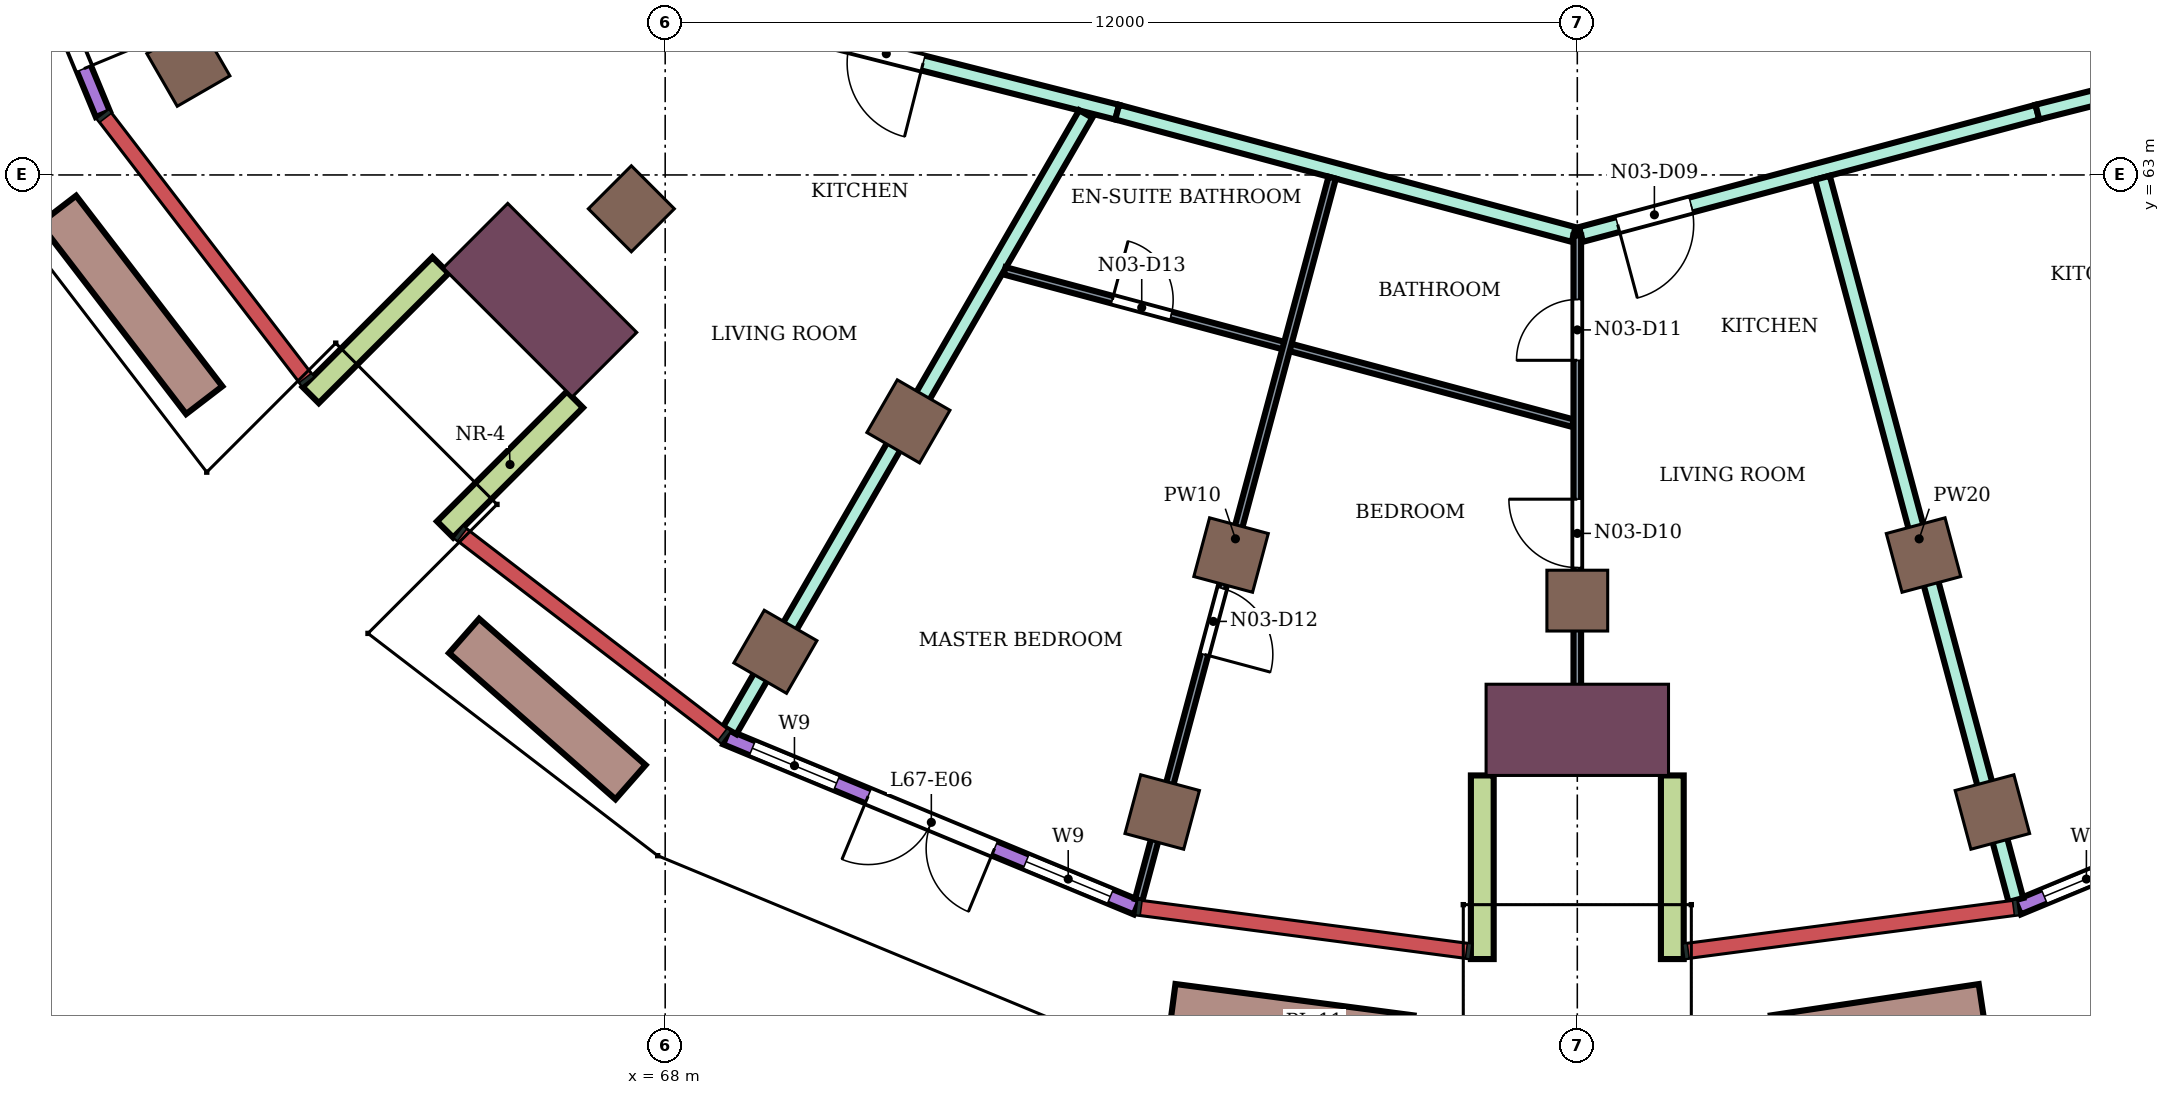
"""IFC4 building model, lengths in metres.
Left out: names, types, materials, properties, quantities, classifications, styles, units other than length and angle.
Written with IfcOpenShell. Run it as: python <this file> out.ifc"""

import sys

from ifc_helpers import new_model, si_unit, direction, frame, frame_2d, origin, origin_2d, place, context, subcontext, project, spatial, rectangle, extrude, element, fill, save


model = new_model("IFC4")
c1 = context("Model", 3, precision=1e-05, world=origin(), true_north=direction((0.0, 1.0)))
c2 = subcontext(c1, "Body", "Model", "MODEL_VIEW")
j1 = project(units=[si_unit("LENGTHUNIT", "METRE"), si_unit("PLANEANGLEUNIT", "RADIAN")], contexts=[c1])
p1 = place(None, origin())
s1 = spatial("IfcSite", under=j1, at=p1, CompositionType="ELEMENT")
p2 = place(p1, origin())
s2 = spatial("IfcBuilding", under=s1, at=p2, CompositionType="ELEMENT")
p3 = place(p2, frame((0.0, 0.0, 292.5)))
s3 = spatial("IfcBuildingStorey", under=s2, at=p3, CompositionType="ELEMENT", Elevation=292.5)
for number, where, z_axis, x_axis in (
    (1, (61.727, 64.45, 0.0), (0.0, 0.0, 1.0), (-0.866, -0.5, 0.0)),
    (2, (69.45, 56.727, 0.0), (0.0, 0.0, 1.0), (-0.5, -0.866, 0.0)),
    (3, (74.539, 54.619, 0.0), (0.0, 0.0, 1.0), (-0.259, -0.966, 0.0)),
    (4, (85.461, 54.619, 0.0), (0.0, 0.0, 1.0), (0.259, -0.966, 0.0)),
    (5, (67.555, 62.555, 0.0), (0.0, 0.0, 1.0), (-0.707, -0.707, 0.0)),
    (6, (71.2, 59.758, 0.0), (0.0, 0.0, 1.0), (-0.5, -0.866, 0.0)),
    (7, (75.445, 58.0, 0.0), (0.0, 0.0, 1.0), (-0.259, -0.966, 0.0)),
    (8, (80.0, 57.4, 0.0), (0.0, 0.0, 1.0), (0.0, -1.0, 0.0)),
    (9, (84.555, 58.0, 0.0), (0.0, 0.0, 1.0), (0.259, -0.966, 0.0)),
):
    element("IfcColumn", number, at=place(p3, frame(where, z_axis=z_axis, x_axis=x_axis)), inside=s3, PredefinedType="COLUMN", context=c2, shape_type="SweptSolid", body=[
        extrude(rectangle(XDim=0.8, YDim=0.8, at=origin_2d()), origin(), (0.0, 0.0, 1.0), 4.2),
    ])
for number, where, z_axis, x_axis in (
    (10, (66.353, 61.353, 0.0), (0.0, 0.0, 1.0), (-0.707, -0.707, 0.0)),
    (11, (80.0, 55.7, 0.0), (0.0, 0.0, 1.0), (0.0, -1.0, 0.0)),
):
    element("IfcColumn", number, at=place(p3, frame(where, z_axis=z_axis, x_axis=x_axis)), inside=s3, PredefinedType="COLUMN", context=c2, shape_type="SweptSolid", body=[
        extrude(rectangle(XDim=1.2, YDim=2.4, at=origin_2d()), origin(), (0.0, 0.0, 1.0), 4.2),
    ])
p4 = place(p3, frame((58.364, 69.203, 0.0), z_axis=(0.0, 0.0, 1.0), x_axis=(0.382708254591, -0.923869250418, 0.0)))
e12 = element("IfcWall", 12, at=p4, inside=s3, PredefinedType="NOTDEFINED", context=c2, shape_type="SweptSolid", body=[
    extrude(rectangle(XDim=5.847, YDim=0.2, at=frame_2d((2.924, 0.0))), origin(), (0.0, 0.0, 1.0), 4.2),
])
p5 = place(p4, frame((1.75, 0.0, 0.9)))
e13 = element("IfcOpeningElement", 13, at=p5, cuts=e12, PredefinedType="OPENING", context=c2, shape_type="SweptSolid", body=[
    extrude(rectangle(XDim=1.2, YDim=2.7, at=frame_2d((0.6, 1.35))), frame((0.0, 0.11, 0.0), z_axis=(0.0, -1.0, 0.0), x_axis=(1.0, 0.0, 0.0)), (0.0, 0.0, 1.0), 0.22),
])
p6 = place(p4, frame((3.4, 0.0, 0.0)))
e14 = element("IfcOpeningElement", 14, at=p6, cuts=e12, PredefinedType="OPENING", context=c2, shape_type="SweptSolid", body=[
    extrude(rectangle(XDim=1.8, YDim=2.7, at=frame_2d((0.9, 1.35))), frame((0.0, 0.11, 0.0), z_axis=(0.0, -1.0, 0.0), x_axis=(1.0, 0.0, 0.0)), (0.0, 0.0, 1.0), 0.22),
])
p7 = place(p3, frame((68.801, 55.602, 0.0), z_axis=(0.0, 0.0, 1.0), x_axis=(0.923869250418, -0.382708254591, 0.0)))
e15 = element("IfcWall", 15, at=p7, inside=s3, PredefinedType="NOTDEFINED", context=c2, shape_type="SweptSolid", body=[
    extrude(rectangle(XDim=5.847, YDim=0.2, at=frame_2d((2.924, 0.0))), origin(), (0.0, 0.0, 1.0), 4.2),
])
p8 = place(p7, frame((0.375, 0.0, 0.9)))
e16 = element("IfcOpeningElement", 16, at=p8, cuts=e15, PredefinedType="OPENING", context=c2, shape_type="SweptSolid", body=[
    extrude(rectangle(XDim=1.2, YDim=2.7, at=frame_2d((0.6, 1.35))), frame((0.0, 0.11, 0.0), z_axis=(0.0, -1.0, 0.0), x_axis=(1.0, 0.0, 0.0)), (0.0, 0.0, 1.0), 0.22),
])
p9 = place(p7, frame((2.024, 0.0, 0.0)))
e17 = element("IfcOpeningElement", 17, at=p9, cuts=e15, PredefinedType="OPENING", context=c2, shape_type="SweptSolid", body=[
    extrude(rectangle(XDim=1.8, YDim=2.7, at=frame_2d((0.9, 1.35))), frame((0.0, 0.11, 0.0), z_axis=(0.0, -1.0, 0.0), x_axis=(1.0, 0.0, 0.0)), (0.0, 0.0, 1.0), 0.22),
])
p10 = place(p7, frame((4.273, 0.0, 0.9)))
e18 = element("IfcOpeningElement", 18, at=p10, cuts=e15, PredefinedType="OPENING", context=c2, shape_type="SweptSolid", body=[
    extrude(rectangle(XDim=1.2, YDim=2.7, at=frame_2d((0.6, 1.35))), frame((0.0, 0.11, 0.0), z_axis=(0.0, -1.0, 0.0), x_axis=(1.0, 0.0, 0.0)), (0.0, 0.0, 1.0), 0.22),
])
p11 = place(p3, frame((85.797, 53.364, 0.0), z_axis=(0.0, 0.0, 1.0), x_axis=(0.923869250418, 0.382708254591, 0.0)))
e19 = element("IfcWall", 19, at=p11, inside=s3, PredefinedType="NOTDEFINED", context=c2, shape_type="SweptSolid", body=[
    extrude(rectangle(XDim=5.847, YDim=0.2, at=frame_2d((2.924, 0.0))), origin(), (0.0, 0.0, 1.0), 4.2),
])
p12 = place(p11, frame((0.375, 0.0, 0.9)))
e20 = element("IfcOpeningElement", 20, at=p12, cuts=e19, PredefinedType="OPENING", context=c2, shape_type="SweptSolid", body=[
    extrude(rectangle(XDim=1.2, YDim=2.7, at=frame_2d((0.6, 1.35))), frame((0.0, 0.11, 0.0), z_axis=(0.0, -1.0, 0.0), x_axis=(1.0, 0.0, 0.0)), (0.0, 0.0, 1.0), 0.22),
])
p13 = place(p11, frame((2.024, 0.0, 0.0)))
e21 = element("IfcOpeningElement", 21, at=p13, cuts=e19, PredefinedType="OPENING", context=c2, shape_type="SweptSolid", body=[
    extrude(rectangle(XDim=1.8, YDim=2.7, at=frame_2d((0.9, 1.35))), frame((0.0, 0.11, 0.0), z_axis=(0.0, -1.0, 0.0), x_axis=(1.0, 0.0, 0.0)), (0.0, 0.0, 1.0), 0.22),
])
p14 = place(p11, frame((4.273, 0.0, 0.9)))
e22 = element("IfcOpeningElement", 22, at=p14, cuts=e19, PredefinedType="OPENING", context=c2, shape_type="SweptSolid", body=[
    extrude(rectangle(XDim=1.2, YDim=2.7, at=frame_2d((0.6, 1.35))), frame((0.0, 0.11, 0.0), z_axis=(0.0, -1.0, 0.0), x_axis=(1.0, 0.0, 0.0)), (0.0, 0.0, 1.0), 0.22),
])
for number, where, z_axis, x_axis in (
    (23, (65.045, 61.812, 0.0), (0.0, 0.0, 1.0), (-0.707, -0.707, 0.0)),
    (24, (66.812, 60.045, 0.0), (0.0, 0.0, 1.0), (-0.707, -0.707, 0.0)),
    (25, (78.75, 55.1, 0.0), (0.0, 0.0, 1.0), (0.0, -1.0, 0.0)),
    (26, (81.25, 55.1, 0.0), (0.0, 0.0, 1.0), (0.0, -1.0, 0.0)),
):
    element("IfcWall", number, at=place(p3, frame(where, z_axis=z_axis, x_axis=x_axis)), inside=s3, PredefinedType="NOTDEFINED", context=c2, shape_type="SweptSolid", body=[
        extrude(rectangle(XDim=2.416, YDim=0.3, at=frame_2d((1.208, 0.0))), origin(), (0.0, 0.0, 1.0), 4.2),
    ])
p15 = place(p3, frame((60.012, 62.544, 0.0), z_axis=(0.0, 0.0, 1.0), x_axis=(0.608765634962, -0.793350112932, 0.0)))
e27 = element("IfcWall", 27, at=p15, inside=s3, PredefinedType="USERDEFINED", context=c2, shape_type="SweptSolid", body=[
    extrude(rectangle(XDim=3.16, YDim=0.6, at=frame_2d((1.58, 0.0))), origin(), (0.0, 0.0, 1.0), 0.6),
])
p16 = place(p3, frame((65.354, 56.936, 0.0), z_axis=(0.0, 0.0, 1.0), x_axis=(0.751246709205, -0.660021501096, 0.0)))
e28 = element("IfcWall", 28, at=p16, inside=s3, PredefinedType="USERDEFINED", context=c2, shape_type="SweptSolid", body=[
    extrude(rectangle(XDim=2.914, YDim=0.6, at=frame_2d((1.457, 0.0))), origin(), (0.0, 0.0, 1.0), 0.6),
])
p17 = place(p3, frame((74.674, 52.059, 0.0), z_axis=(0.0, 0.0, 1.0), x_axis=(0.991438509602, -0.130574429647, 0.0)))
e29 = element("IfcWall", 29, at=p17, inside=s3, PredefinedType="USERDEFINED", context=c2, shape_type="SweptSolid", body=[
    extrude(rectangle(XDim=3.16, YDim=0.6, at=frame_2d((1.58, 0.0))), origin(), (0.0, 0.0, 1.0), 0.6),
])
p18 = place(p3, frame((82.59, 51.646, 0.0), z_axis=(0.0, 0.0, 1.0), x_axis=(0.988820205867, 0.14911271062, 0.0)))
e30 = element("IfcWall", 30, at=p18, inside=s3, PredefinedType="USERDEFINED", context=c2, shape_type="SweptSolid", body=[
    extrude(rectangle(XDim=2.767, YDim=0.6, at=frame_2d((1.384, 0.0))), origin(), (0.0, 0.0, 1.0), 0.6),
])
p19 = place(p3, frame((68.201, 65.28, 0.0), z_axis=(0.0, 0.0, 1.0), x_axis=(0.969421088032, -0.245403247897, 0.0)))
e31 = element("IfcWall", 31, at=p19, inside=s3, PredefinedType="PARTITIONING", context=c2, shape_type="SweptSolid", body=[
    extrude(rectangle(XDim=5.927, YDim=0.2, at=frame_2d((2.964, 0.0))), origin(), (0.0, 0.0, 1.0), 3.75),
])
p20 = place(p19, frame((2.293, 0.0, 0.0)))
e32 = element("IfcOpeningElement", 32, at=p20, cuts=e31, PredefinedType="OPENING", context=c2, shape_type="SweptSolid", body=[
    extrude(rectangle(XDim=1.0, YDim=2.1, at=frame_2d((0.5, 1.05))), frame((0.0, 0.11, 0.0), z_axis=(0.0, -1.0, 0.0), x_axis=(1.0, 0.0, 0.0)), (0.0, 0.0, 1.0), 0.22),
])
p21 = place(p3, frame((68.849, 55.692, 0.0), z_axis=(0.0, 0.0, 1.0), x_axis=(0.50011732958, 0.865957652922, 0.0)))
e33 = element("IfcWall", 33, at=p21, inside=s3, PredefinedType="PARTITIONING", context=c2, shape_type="SweptSolid", body=[
    extrude(rectangle(XDim=9.365, YDim=0.2, at=frame_2d((4.683, 0.0))), origin(), (0.0, 0.0, 1.0), 3.75),
])
p22 = place(p3, frame((73.947, 63.826, 0.0), z_axis=(0.0, 0.0, 1.0), x_axis=(0.965908253407, -0.258884619088, 0.0)))
e34 = element("IfcWall", 34, at=p22, inside=s3, PredefinedType="PARTITIONING", context=c2, shape_type="SweptSolid", body=[
    extrude(rectangle(XDim=6.217, YDim=0.2, at=frame_2d((3.108, 0.0))), origin(), (0.0, 0.0, 1.0), 3.75),
])
p23 = place(p3, frame((80.048, 62.217, 0.0), z_axis=(0.0, 0.0, 1.0), x_axis=(0.965937709386, 0.258774692708, 0.0)))
e35 = element("IfcWall", 35, at=p23, inside=s3, PredefinedType="PARTITIONING", context=c2, shape_type="SweptSolid", body=[
    extrude(rectangle(XDim=6.216, YDim=0.2, at=frame_2d((3.108, 0.0))), origin(), (0.0, 0.0, 1.0), 3.75),
])
p24 = place(p23, frame((0.5, 0.0, 0.0)))
e36 = element("IfcOpeningElement", 36, at=p24, cuts=e35, PredefinedType="OPENING", context=c2, shape_type="SweptSolid", body=[
    extrude(rectangle(XDim=1.0, YDim=2.1, at=frame_2d((0.5, 1.05))), frame((0.0, 0.11, 0.0), z_axis=(0.0, -1.0, 0.0), x_axis=(1.0, 0.0, 0.0)), (0.0, 0.0, 1.0), 0.22),
])
p25 = place(p3, frame((83.225, 62.963, 0.0), z_axis=(0.0, 0.0, 1.0), x_axis=(0.258782398991, -0.96593564484, 0.0)))
e37 = element("IfcWall", 37, at=p25, inside=s3, PredefinedType="PARTITIONING", context=c2, shape_type="SweptSolid", body=[
    extrude(rectangle(XDim=9.837, YDim=0.2, at=frame_2d((4.918, 0.0))), origin(), (0.0, 0.0, 1.0), 3.75),
])
p26 = place(p3, frame((86.053, 63.826, 0.0), z_axis=(0.0, 0.0, 1.0), x_axis=(0.969480070232, 0.245170131586, 0.0)))
e38 = element("IfcWall", 38, at=p26, inside=s3, PredefinedType="PARTITIONING", context=c2, shape_type="SweptSolid", body=[
    extrude(rectangle(XDim=5.907, YDim=0.2, at=frame_2d((2.954, 0.0))), origin(), (0.0, 0.0, 1.0), 3.75),
])
p27 = place(p26, frame((2.464, 0.0, 0.0)))
e39 = element("IfcOpeningElement", 39, at=p27, cuts=e38, PredefinedType="OPENING", context=c2, shape_type="SweptSolid", body=[
    extrude(rectangle(XDim=1.0, YDim=2.1, at=frame_2d((0.5, 1.05))), frame((0.0, 0.11, 0.0), z_axis=(0.0, -1.0, 0.0), x_axis=(1.0, 0.0, 0.0)), (0.0, 0.0, 1.0), 0.22),
])
p28 = place(p3, frame((72.465, 61.739, 0.0), z_axis=(0.0, 0.0, 1.0), x_axis=(0.965899611634, -0.258916859715, 0.0)))
e40 = element("IfcWall", 40, at=p28, inside=s3, PredefinedType="PARTITIONING", context=c2, shape_type="SweptSolid", body=[
    extrude(rectangle(XDim=7.74, YDim=0.1, at=frame_2d((3.87, 0.0))), origin(), (0.0, 0.0, 1.0), 3.75),
])
p29 = place(p28, frame((1.468, 0.0, 0.0)))
e41 = element("IfcOpeningElement", 41, at=p29, cuts=e40, PredefinedType="OPENING", context=c2, shape_type="SweptSolid", body=[
    extrude(rectangle(XDim=0.8, YDim=2.1, at=frame_2d((0.4, 1.05))), frame((0.0, 0.06, 0.0), z_axis=(0.0, -1.0, 0.0), x_axis=(1.0, 0.0, 0.0)), (0.0, 0.0, 1.0), 0.12),
])
p30 = place(p3, frame((74.229, 53.462, 0.0), z_axis=(0.0, 0.0, 1.0), x_axis=(0.258810097991, 0.965928223616, 0.0)))
e42 = element("IfcWall", 42, at=p30, inside=s3, PredefinedType="PARTITIONING", context=c2, shape_type="SweptSolid", body=[
    extrude(rectangle(XDim=9.838, YDim=0.1, at=frame_2d((4.919, 0.0))), origin(), (0.0, 0.0, 1.0), 3.75),
])
p31 = place(p30, frame((3.344, 0.0, 0.0)))
e43 = element("IfcOpeningElement", 43, at=p31, cuts=e42, PredefinedType="OPENING", context=c2, shape_type="SweptSolid", body=[
    extrude(rectangle(XDim=0.9, YDim=2.1, at=frame_2d((0.45, 1.05))), frame((0.0, 0.06, 0.0), z_axis=(0.0, -1.0, 0.0), x_axis=(1.0, 0.0, 0.0)), (0.0, 0.0, 1.0), 0.12),
])
p32 = place(p3, frame((80.0, 55.3, 0.0), z_axis=(0.0, 0.0, 1.0), x_axis=(0.0, 1.0, 0.0)))
e44 = element("IfcWall", 44, at=p32, inside=s3, PredefinedType="PARTITIONING", context=c2, shape_type="SweptSolid", body=[
    extrude(rectangle(XDim=6.904, YDim=0.1, at=frame_2d((3.452, 0.0))), origin(), (0.0, 0.0, 1.0), 3.75),
])
p33 = place(p32, frame((2.534, 0.0, 0.0)))
e45 = element("IfcOpeningElement", 45, at=p33, cuts=e44, PredefinedType="OPENING", context=c2, shape_type="SweptSolid", body=[
    extrude(rectangle(XDim=0.9, YDim=2.1, at=frame_2d((0.45, 1.05))), frame((0.0, 0.06, 0.0), z_axis=(0.0, -1.0, 0.0), x_axis=(1.0, 0.0, 0.0)), (0.0, 0.0, 1.0), 0.12),
])
p34 = place(p32, frame((5.261, 0.0, 0.0)))
e46 = element("IfcOpeningElement", 46, at=p34, cuts=e44, PredefinedType="OPENING", context=c2, shape_type="SweptSolid", body=[
    extrude(rectangle(XDim=0.8, YDim=2.1, at=frame_2d((0.4, 1.05))), frame((0.0, 0.06, 0.0), z_axis=(0.0, -1.0, 0.0), x_axis=(1.0, 0.0, 0.0)), (0.0, 0.0, 1.0), 0.12),
])
p35 = place(p6, origin())
e47 = element("IfcDoor", 47, at=p35, inside=s3, OperationType="DOUBLE_DOOR_SINGLE_SWING", PredefinedType="DOOR", context=c2, shape_type="SweptSolid", body=[
    extrude(rectangle(XDim=1.8, YDim=2.7, at=frame_2d((0.9, 1.35))), frame((0.0, 0.025, 0.0), z_axis=(0.0, -1.0, 0.0), x_axis=(1.0, 0.0, 0.0)), (0.0, 0.0, 1.0), 0.05),
])
fill(e14, e47)
p36 = place(p8, origin())
e48 = element("IfcWindow", 48, at=p36, inside=s3, PartitioningType="SINGLE_PANEL", PredefinedType="WINDOW", context=c2, shape_type="SweptSolid", body=[
    extrude(rectangle(XDim=1.2, YDim=2.7, at=frame_2d((0.6, 1.35))), frame((0.0, 0.03, 0.0), z_axis=(0.0, -1.0, 0.0), x_axis=(1.0, 0.0, 0.0)), (0.0, 0.0, 1.0), 0.06),
])
fill(e16, e48)
p37 = place(p9, frame((1.8, 0.0, 0.0), z_axis=(0.0, 0.0, 1.0), x_axis=(-1.0, 0.0, 0.0)))
e49 = element("IfcDoor", 49, at=p37, inside=s3, OperationType="DOUBLE_DOOR_SINGLE_SWING", PredefinedType="DOOR", context=c2, shape_type="SweptSolid", body=[
    extrude(rectangle(XDim=1.8, YDim=2.7, at=frame_2d((0.9, 1.35))), frame((0.0, 0.025, 0.0), z_axis=(0.0, -1.0, 0.0), x_axis=(1.0, 0.0, 0.0)), (0.0, 0.0, 1.0), 0.05),
])
fill(e17, e49)
p38 = place(p10, origin())
e50 = element("IfcWindow", 50, at=p38, inside=s3, PartitioningType="SINGLE_PANEL", PredefinedType="WINDOW", context=c2, shape_type="SweptSolid", body=[
    extrude(rectangle(XDim=1.2, YDim=2.7, at=frame_2d((0.6, 1.35))), frame((0.0, 0.03, 0.0), z_axis=(0.0, -1.0, 0.0), x_axis=(1.0, 0.0, 0.0)), (0.0, 0.0, 1.0), 0.06),
])
fill(e18, e50)
p39 = place(p12, origin())
e51 = element("IfcWindow", 51, at=p39, inside=s3, PartitioningType="SINGLE_PANEL", PredefinedType="WINDOW", context=c2, shape_type="SweptSolid", body=[
    extrude(rectangle(XDim=1.2, YDim=2.7, at=frame_2d((0.6, 1.35))), frame((0.0, 0.03, 0.0), z_axis=(0.0, -1.0, 0.0), x_axis=(1.0, 0.0, 0.0)), (0.0, 0.0, 1.0), 0.06),
])
fill(e20, e51)
p40 = place(p24, frame((1.0, 0.0, 0.0), z_axis=(0.0, 0.0, 1.0), x_axis=(-1.0, 0.0, 0.0)))
e52 = element("IfcDoor", 52, at=p40, inside=s3, OperationType="SINGLE_SWING_RIGHT", PredefinedType="DOOR", context=c2, shape_type="SweptSolid", body=[
    extrude(rectangle(XDim=1.0, YDim=2.1, at=frame_2d((0.5, 1.05))), frame((0.0, 0.025, 0.0), z_axis=(0.0, -1.0, 0.0), x_axis=(1.0, 0.0, 0.0)), (0.0, 0.0, 1.0), 0.05),
])
fill(e36, e52)
p41 = place(p33, origin())
e53 = element("IfcDoor", 53, at=p41, inside=s3, OperationType="SINGLE_SWING_RIGHT", PredefinedType="DOOR", context=c2, shape_type="SweptSolid", body=[
    extrude(rectangle(XDim=0.9, YDim=2.1, at=frame_2d((0.45, 1.05))), frame((0.0, 0.025, 0.0), z_axis=(0.0, -1.0, 0.0), x_axis=(1.0, 0.0, 0.0)), (0.0, 0.0, 1.0), 0.05),
])
fill(e45, e53)
p42 = place(p34, origin())
e54 = element("IfcDoor", 54, at=p42, inside=s3, OperationType="SINGLE_SWING_LEFT", PredefinedType="DOOR", context=c2, shape_type="SweptSolid", body=[
    extrude(rectangle(XDim=0.8, YDim=2.1, at=frame_2d((0.4, 1.05))), frame((0.0, 0.025, 0.0), z_axis=(0.0, -1.0, 0.0), x_axis=(1.0, 0.0, 0.0)), (0.0, 0.0, 1.0), 0.05),
])
fill(e46, e54)
p43 = place(p31, frame((0.9, 0.0, 0.0), z_axis=(0.0, 0.0, 1.0), x_axis=(-1.0, 0.0, 0.0)))
e55 = element("IfcDoor", 55, at=p43, inside=s3, OperationType="SINGLE_SWING_RIGHT", PredefinedType="DOOR", context=c2, shape_type="SweptSolid", body=[
    extrude(rectangle(XDim=0.9, YDim=2.1, at=frame_2d((0.45, 1.05))), frame((0.0, 0.025, 0.0), z_axis=(0.0, -1.0, 0.0), x_axis=(1.0, 0.0, 0.0)), (0.0, 0.0, 1.0), 0.05),
])
fill(e43, e55)
p44 = place(p29, origin())
e56 = element("IfcDoor", 56, at=p44, inside=s3, OperationType="SINGLE_SWING_LEFT", PredefinedType="DOOR", context=c2, shape_type="SweptSolid", body=[
    extrude(rectangle(XDim=0.8, YDim=2.1, at=frame_2d((0.4, 1.05))), frame((0.0, 0.025, 0.0), z_axis=(0.0, -1.0, 0.0), x_axis=(1.0, 0.0, 0.0)), (0.0, 0.0, 1.0), 0.05),
])
fill(e41, e56)
p45 = place(p20, frame((1.0, 0.0, 0.0), z_axis=(0.0, 0.0, 1.0), x_axis=(-1.0, 0.0, 0.0)))
e57 = element("IfcDoor", 57, at=p45, inside=s3, OperationType="SINGLE_SWING_LEFT", PredefinedType="DOOR", context=c2, shape_type="SweptSolid", body=[
    extrude(rectangle(XDim=1.0, YDim=2.1, at=frame_2d((0.5, 1.05))), frame((0.0, 0.025, 0.0), z_axis=(0.0, -1.0, 0.0), x_axis=(1.0, 0.0, 0.0)), (0.0, 0.0, 1.0), 0.05),
])
fill(e32, e57)
save(model, sys.argv[1])
